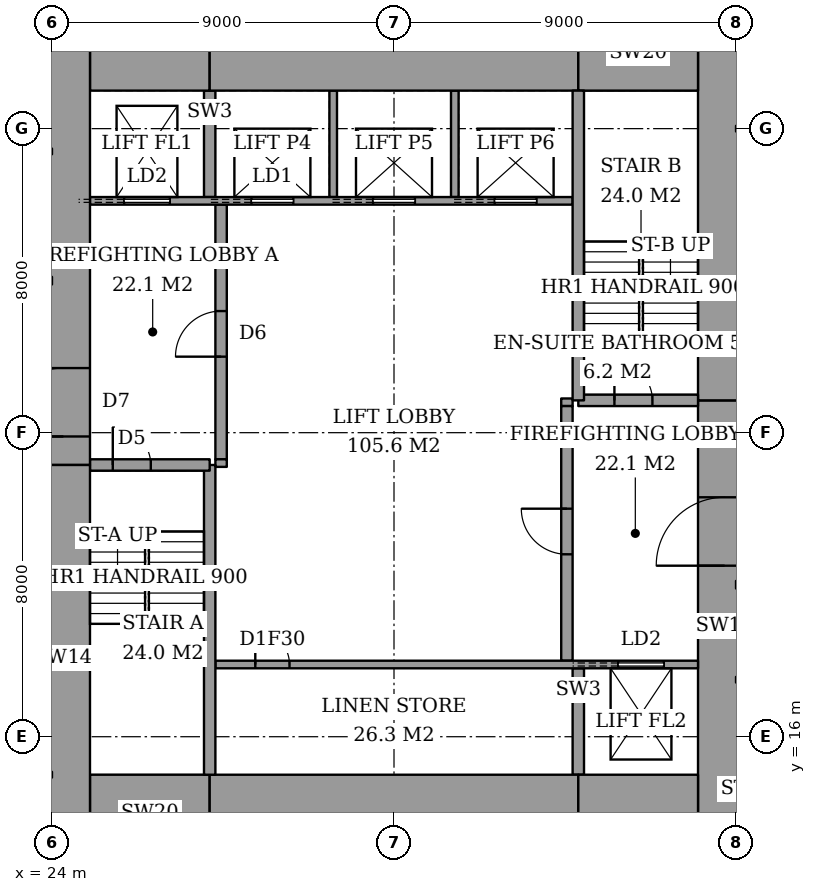
"""IFC4 building model, lengths in metres.
Left out: names, types, materials, properties, quantities, classifications, styles, units other than length and angle.
Written with IfcOpenShell. Run it as: python <this file> out.ifc"""

import sys

from ifc_helpers import new_model, si_unit, direction, frame, frame_2d, origin, place, context, subcontext, project, spatial, rectangle, extrude, element, fill, save


model = new_model("IFC4")
c1 = context("Model", 3, precision=1e-05, world=origin(), true_north=direction((0.0, 1.0)))
c2 = subcontext(c1, "Body", "Model", "MODEL_VIEW")
j1 = project(units=[si_unit("LENGTHUNIT", "METRE"), si_unit("PLANEANGLEUNIT", "RADIAN")], contexts=[c1])
p1 = place(None, origin())
s1 = spatial("IfcSite", under=j1, at=p1, CompositionType="ELEMENT")
p2 = place(p1, origin())
s2 = spatial("IfcBuilding", under=s1, at=p2, CompositionType="ELEMENT")
p3 = place(p2, frame((0.0, 0.0, 211.0)))
s3 = spatial("IfcBuildingStorey", under=s2, at=p3, CompositionType="ELEMENT", Elevation=211.0)
p4 = place(p3, frame((25.0, 14.0, 0.0), z_axis=(0.0, 0.0, 1.0), x_axis=(1.0, 0.0, 0.0)))
e1 = element("IfcWall", 1, at=p4, inside=s3, PredefinedType="SHEAR", context=c2, shape_type="SweptSolid", body=[
    extrude(rectangle(XDim=3.15, YDim=2.0, at=frame_2d((1.575, 0.0))), origin(), (0.0, 0.0, 1.0), 3.6),
])
p5 = place(p3, frame((28.15, 14.0, 0.0), z_axis=(0.0, 0.0, 1.0), x_axis=(1.0, 0.0, 0.0)))
e2 = element("IfcWall", 2, at=p5, inside=s3, PredefinedType="SHEAR", context=c2, shape_type="SweptSolid", body=[
    extrude(rectangle(XDim=9.7, YDim=2.0, at=frame_2d((4.85, 0.0))), origin(), (0.0, 0.0, 1.0), 3.6),
])
for number, where, z_axis, x_axis in (
    (3, (37.85, 14.0, 0.0), (0.0, 0.0, 1.0), (1.0, 0.0, 0.0)),
    (4, (25.0, 34.0, 0.0), (0.0, 0.0, 1.0), (1.0, 0.0, 0.0)),
):
    element("IfcWall", number, at=place(p3, frame(where, z_axis=z_axis, x_axis=x_axis)), inside=s3, PredefinedType="SHEAR", context=c2, shape_type="SweptSolid", body=[
        extrude(rectangle(XDim=3.15, YDim=2.0, at=frame_2d((1.575, 0.0))), origin(), (0.0, 0.0, 1.0), 3.6),
    ])
p6 = place(p3, frame((28.15, 34.0, 0.0), z_axis=(0.0, 0.0, 1.0), x_axis=(1.0, 0.0, 0.0)))
e5 = element("IfcWall", 5, at=p6, inside=s3, PredefinedType="SHEAR", context=c2, shape_type="SweptSolid", body=[
    extrude(rectangle(XDim=9.7, YDim=2.0, at=frame_2d((4.85, 0.0))), origin(), (0.0, 0.0, 1.0), 3.6),
])
p7 = place(p3, frame((37.85, 34.0, 0.0), z_axis=(0.0, 0.0, 1.0), x_axis=(1.0, 0.0, 0.0)))
e6 = element("IfcWall", 6, at=p7, inside=s3, PredefinedType="SHEAR", context=c2, shape_type="SweptSolid", body=[
    extrude(rectangle(XDim=3.15, YDim=2.0, at=frame_2d((1.575, 0.0))), origin(), (0.0, 0.0, 1.0), 3.6),
])
p8 = place(p3, frame((24.3, 13.0, 0.0), z_axis=(0.0, 0.0, 1.0), x_axis=(0.0, 1.0, 0.0)))
e7 = element("IfcWall", 7, at=p8, inside=s3, PredefinedType="SHEAR", context=c2, shape_type="SweptSolid", body=[
    extrude(rectangle(XDim=10.15, YDim=1.4, at=frame_2d((5.075, 0.0))), origin(), (0.0, 0.0, 1.0), 3.6),
])
p9 = place(p3, frame((24.3, 23.15, 0.0), z_axis=(0.0, 0.0, 1.0), x_axis=(0.0, 1.0, 0.0)))
e8 = element("IfcWall", 8, at=p9, inside=s3, PredefinedType="SHEAR", context=c2, shape_type="SweptSolid", body=[
    extrude(rectangle(XDim=11.85, YDim=1.4, at=frame_2d((5.925, 0.0))), origin(), (0.0, 0.0, 1.0), 3.6),
])
p10 = place(p9, frame((0.75, 0.0, 0.0)))
e9 = element("IfcOpeningElement", 9, at=p10, cuts=e8, PredefinedType="OPENING", context=c2, shape_type="SweptSolid", body=[
    extrude(rectangle(XDim=1.8, YDim=2.4, at=frame_2d((0.9, 1.2))), frame((0.0, 0.71, 0.0), z_axis=(0.0, -1.0, 0.0), x_axis=(1.0, 0.0, 0.0)), (0.0, 0.0, 1.0), 1.42),
])
p11 = place(p3, frame((41.7, 13.0, 0.0), z_axis=(0.0, 0.0, 1.0), x_axis=(0.0, 1.0, 0.0)))
e10 = element("IfcWall", 10, at=p11, inside=s3, PredefinedType="SHEAR", context=c2, shape_type="SweptSolid", body=[
    extrude(rectangle(XDim=11.85, YDim=1.4, at=frame_2d((5.925, 0.0))), origin(), (0.0, 0.0, 1.0), 3.6),
])
p12 = place(p11, frame((7.5, 0.0, 0.0)))
e11 = element("IfcOpeningElement", 11, at=p12, cuts=e10, PredefinedType="OPENING", context=c2, shape_type="SweptSolid", body=[
    extrude(rectangle(XDim=1.8, YDim=2.4, at=frame_2d((0.9, 1.2))), frame((0.0, 0.71, 0.0), z_axis=(0.0, -1.0, 0.0), x_axis=(1.0, 0.0, 0.0)), (0.0, 0.0, 1.0), 1.42),
])
p13 = place(p3, frame((41.7, 24.85, 0.0), z_axis=(0.0, 0.0, 1.0), x_axis=(0.0, 1.0, 0.0)))
e12 = element("IfcWall", 12, at=p13, inside=s3, PredefinedType="SHEAR", context=c2, shape_type="SweptSolid", body=[
    extrude(rectangle(XDim=10.15, YDim=1.4, at=frame_2d((5.075, 0.0))), origin(), (0.0, 0.0, 1.0), 3.6),
])
p14 = place(p3, frame((28.15, 15.0, 0.0), z_axis=(0.0, 0.0, 1.0), x_axis=(0.0, 1.0, 0.0)))
e13 = element("IfcWall", 13, at=p14, inside=s3, PredefinedType="SHEAR", context=c2, shape_type="SweptSolid", body=[
    extrude(rectangle(XDim=8.15, YDim=0.3, at=frame_2d((4.075, 0.0))), origin(), (0.0, 0.0, 1.0), 3.6),
])
p15 = place(p3, frame((25.0, 23.15, 0.0), z_axis=(0.0, 0.0, 1.0), x_axis=(1.0, 0.0, 0.0)))
e14 = element("IfcWall", 14, at=p15, inside=s3, PredefinedType="SHEAR", context=c2, shape_type="SweptSolid", body=[
    extrude(rectangle(XDim=3.15, YDim=0.3, at=frame_2d((1.575, 0.0))), origin(), (0.0, 0.0, 1.0), 3.6),
])
p16 = place(p15, frame((0.6, 0.0, 0.0)))
e15 = element("IfcOpeningElement", 15, at=p16, cuts=e14, PredefinedType="OPENING", context=c2, shape_type="SweptSolid", body=[
    extrude(rectangle(XDim=1.0, YDim=2.1, at=frame_2d((0.5, 1.05))), frame((0.0, 0.16, 0.0), z_axis=(0.0, -1.0, 0.0), x_axis=(1.0, 0.0, 0.0)), (0.0, 0.0, 1.0), 0.32),
])
p17 = place(p3, frame((37.85, 24.85, 0.0), z_axis=(0.0, 0.0, 1.0), x_axis=(0.0, 1.0, 0.0)))
e16 = element("IfcWall", 16, at=p17, inside=s3, PredefinedType="SHEAR", context=c2, shape_type="SweptSolid", body=[
    extrude(rectangle(XDim=8.15, YDim=0.3, at=frame_2d((4.075, 0.0))), origin(), (0.0, 0.0, 1.0), 3.6),
])
p18 = place(p3, frame((37.85, 24.85, 0.0), z_axis=(0.0, 0.0, 1.0), x_axis=(1.0, 0.0, 0.0)))
e17 = element("IfcWall", 17, at=p18, inside=s3, PredefinedType="SHEAR", context=c2, shape_type="SweptSolid", body=[
    extrude(rectangle(XDim=3.15, YDim=0.3, at=frame_2d((1.575, 0.0))), origin(), (0.0, 0.0, 1.0), 3.6),
])
p19 = place(p18, frame((0.95, 0.0, 0.0)))
e18 = element("IfcOpeningElement", 18, at=p19, cuts=e17, PredefinedType="OPENING", context=c2, shape_type="SweptSolid", body=[
    extrude(rectangle(XDim=1.0, YDim=2.1, at=frame_2d((0.5, 1.05))), frame((0.0, 0.16, 0.0), z_axis=(0.0, -1.0, 0.0), x_axis=(1.0, 0.0, 0.0)), (0.0, 0.0, 1.0), 0.32),
])
p20 = place(p3, frame((28.45, 23.3, 0.0), z_axis=(0.0, 0.0, 1.0), x_axis=(0.0, 1.0, 0.0)))
e19 = element("IfcWall", 19, at=p20, inside=s3, PredefinedType="PARTITIONING", context=c2, shape_type="SweptSolid", body=[
    extrude(rectangle(XDim=6.7, YDim=0.3, at=frame_2d((3.35, 0.0))), origin(), (0.0, 0.0, 1.0), 3.6),
])
p21 = place(p20, frame((2.7, 0.0, 0.0)))
e20 = element("IfcOpeningElement", 20, at=p21, cuts=e19, PredefinedType="OPENING", context=c2, shape_type="SweptSolid", body=[
    extrude(rectangle(XDim=1.2, YDim=2.1, at=frame_2d((0.6, 1.05))), frame((0.0, 0.16, 0.0), z_axis=(0.0, -1.0, 0.0), x_axis=(1.0, 0.0, 0.0)), (0.0, 0.0, 1.0), 0.32),
])
p22 = place(p3, frame((37.55, 18.0, 0.0), z_axis=(0.0, 0.0, 1.0), x_axis=(0.0, 1.0, 0.0)))
e21 = element("IfcWall", 21, at=p22, inside=s3, PredefinedType="PARTITIONING", context=c2, shape_type="SweptSolid", body=[
    extrude(rectangle(XDim=6.7, YDim=0.3, at=frame_2d((3.35, 0.0))), origin(), (0.0, 0.0, 1.0), 3.6),
])
p23 = place(p22, frame((2.8, 0.0, 0.0)))
e22 = element("IfcOpeningElement", 22, at=p23, cuts=e21, PredefinedType="OPENING", context=c2, shape_type="SweptSolid", body=[
    extrude(rectangle(XDim=1.2, YDim=2.1, at=frame_2d((0.6, 1.05))), frame((0.0, 0.16, 0.0), z_axis=(0.0, -1.0, 0.0), x_axis=(1.0, 0.0, 0.0)), (0.0, 0.0, 1.0), 0.32),
])
p24 = place(p3, frame((28.3, 17.9, 0.0), z_axis=(0.0, 0.0, 1.0), x_axis=(1.0, 0.0, 0.0)))
e23 = element("IfcWall", 23, at=p24, inside=s3, PredefinedType="PARTITIONING", context=c2, shape_type="SweptSolid", body=[
    extrude(rectangle(XDim=12.7, YDim=0.2, at=frame_2d((6.35, 0.0))), origin(), (0.0, 0.0, 1.0), 3.6),
])
p25 = place(p24, frame((1.05, 0.0, 0.0)))
e24 = element("IfcOpeningElement", 24, at=p25, cuts=e23, PredefinedType="OPENING", context=c2, shape_type="SweptSolid", body=[
    extrude(rectangle(XDim=0.9, YDim=2.1, at=frame_2d((0.45, 1.05))), frame((0.0, 0.11, 0.0), z_axis=(0.0, -1.0, 0.0), x_axis=(1.0, 0.0, 0.0)), (0.0, 0.0, 1.0), 0.22),
])
p26 = place(p24, frame((10.6, 0.0, 0.0)))
e25 = element("IfcOpeningElement", 25, at=p26, cuts=e23, PredefinedType="OPENING", context=c2, shape_type="SweptSolid", body=[
    extrude(rectangle(XDim=1.2, YDim=2.1, at=frame_2d((0.6, 1.05))), frame((0.0, 0.11, 0.0), z_axis=(0.0, -1.0, 0.0), x_axis=(1.0, 0.0, 0.0)), (0.0, 0.0, 1.0), 0.22),
])
p27 = place(p3, frame((25.0, 30.1, 0.0), z_axis=(0.0, 0.0, 1.0), x_axis=(1.0, 0.0, 0.0)))
e26 = element("IfcWall", 26, at=p27, inside=s3, PredefinedType="PARTITIONING", context=c2, shape_type="SweptSolid", body=[
    extrude(rectangle(XDim=12.7, YDim=0.2, at=frame_2d((6.35, 0.0))), origin(), (0.0, 0.0, 1.0), 3.6),
])
p28 = place(p27, frame((4.25, 0.0, 0.0)))
e27 = element("IfcOpeningElement", 27, at=p28, cuts=e26, PredefinedType="OPENING", context=c2, shape_type="SweptSolid", body=[
    extrude(rectangle(XDim=1.1, YDim=2.1, at=frame_2d((0.55, 1.05))), frame((0.0, 0.11, 0.0), z_axis=(0.0, -1.0, 0.0), x_axis=(1.0, 0.0, 0.0)), (0.0, 0.0, 1.0), 0.22),
])
p29 = place(p27, frame((7.45, 0.0, 0.0)))
e28 = element("IfcOpeningElement", 28, at=p29, cuts=e26, PredefinedType="OPENING", context=c2, shape_type="SweptSolid", body=[
    extrude(rectangle(XDim=1.1, YDim=2.1, at=frame_2d((0.55, 1.05))), frame((0.0, 0.11, 0.0), z_axis=(0.0, -1.0, 0.0), x_axis=(1.0, 0.0, 0.0)), (0.0, 0.0, 1.0), 0.22),
])
p30 = place(p27, frame((10.65, 0.0, 0.0)))
e29 = element("IfcOpeningElement", 29, at=p30, cuts=e26, PredefinedType="OPENING", context=c2, shape_type="SweptSolid", body=[
    extrude(rectangle(XDim=1.1, YDim=2.1, at=frame_2d((0.55, 1.05))), frame((0.0, 0.11, 0.0), z_axis=(0.0, -1.0, 0.0), x_axis=(1.0, 0.0, 0.0)), (0.0, 0.0, 1.0), 0.22),
])
p31 = place(p27, frame((0.9, 0.0, 0.0)))
e30 = element("IfcOpeningElement", 30, at=p31, cuts=e26, PredefinedType="OPENING", context=c2, shape_type="SweptSolid", body=[
    extrude(rectangle(XDim=1.2, YDim=2.1, at=frame_2d((0.6, 1.05))), frame((0.0, 0.11, 0.0), z_axis=(0.0, -1.0, 0.0), x_axis=(1.0, 0.0, 0.0)), (0.0, 0.0, 1.0), 0.22),
])
p32 = place(p3, frame((37.85, 15.0, 0.0), z_axis=(0.0, 0.0, 1.0), x_axis=(0.0, 1.0, 0.0)))
e31 = element("IfcWall", 31, at=p32, inside=s3, PredefinedType="SHEAR", context=c2, shape_type="SweptSolid", body=[
    extrude(rectangle(XDim=2.8, YDim=0.3, at=frame_2d((1.4, 0.0))), origin(), (0.0, 0.0, 1.0), 3.6),
])
for number, where, z_axis, x_axis in (
    (32, (31.4, 30.2, 0.0), (0.0, 0.0, 1.0), (0.0, 1.0, 0.0)),
    (33, (34.6, 30.2, 0.0), (0.0, 0.0, 1.0), (0.0, 1.0, 0.0)),
):
    element("IfcWall", number, at=place(p3, frame(where, z_axis=z_axis, x_axis=x_axis)), inside=s3, PredefinedType="PARTITIONING", context=c2, shape_type="SweptSolid", body=[
        extrude(rectangle(XDim=2.8, YDim=0.2, at=frame_2d((1.4, 0.0))), origin(), (0.0, 0.0, 1.0), 3.6),
    ])
p33 = place(p3, frame((28.15, 30.2, 0.0), z_axis=(0.0, 0.0, 1.0), x_axis=(0.0, 1.0, 0.0)))
e34 = element("IfcWall", 34, at=p33, inside=s3, PredefinedType="SHEAR", context=c2, shape_type="SweptSolid", body=[
    extrude(rectangle(XDim=2.8, YDim=0.3, at=frame_2d((1.4, 0.0))), origin(), (0.0, 0.0, 1.0), 3.6),
])
for number, where, z_axis, x_axis in (
    (35, (28.3, 23.2, 0.0), (0.0, 0.0, 1.0), (1.0, 0.0, 0.0)),
    (36, (37.4, 24.8, 0.0), (0.0, 0.0, 1.0), (1.0, 0.0, 0.0)),
):
    element("IfcWall", number, at=place(p3, frame(where, z_axis=z_axis, x_axis=x_axis)), inside=s3, PredefinedType="PARTITIONING", context=c2, shape_type="SweptSolid", body=[
        extrude(rectangle(XDim=0.3, YDim=0.2, at=frame_2d((0.15, 0.0))), origin(), (0.0, 0.0, 1.0), 3.6),
    ])
p34 = place(p16, origin())
e37 = element("IfcDoor", 37, at=p34, inside=s3, OperationType="SINGLE_SWING_RIGHT", PredefinedType="DOOR", context=c2, shape_type="SweptSolid", body=[
    extrude(rectangle(XDim=1.0, YDim=2.1, at=frame_2d((0.5, 1.05))), frame((0.0, 0.025, 0.0), z_axis=(0.0, -1.0, 0.0), x_axis=(1.0, 0.0, 0.0)), (0.0, 0.0, 1.0), 0.05),
])
fill(e15, e37)
p35 = place(p19, origin())
e38 = element("IfcDoor", 38, at=p35, inside=s3, OperationType="SINGLE_SWING_RIGHT", PredefinedType="DOOR", context=c2, shape_type="SweptSolid", body=[
    extrude(rectangle(XDim=1.0, YDim=2.1, at=frame_2d((0.5, 1.05))), frame((0.0, 0.025, 0.0), z_axis=(0.0, -1.0, 0.0), x_axis=(1.0, 0.0, 0.0)), (0.0, 0.0, 1.0), 0.05),
])
fill(e18, e38)
p36 = place(p21, origin())
e39 = element("IfcDoor", 39, at=p36, inside=s3, OperationType="SINGLE_SWING_RIGHT", PredefinedType="DOOR", context=c2, shape_type="SweptSolid", body=[
    extrude(rectangle(XDim=1.2, YDim=2.1, at=frame_2d((0.6, 1.05))), frame((0.0, 0.025, 0.0), z_axis=(0.0, -1.0, 0.0), x_axis=(1.0, 0.0, 0.0)), (0.0, 0.0, 1.0), 0.05),
])
fill(e20, e39)
p37 = place(p23, origin())
e40 = element("IfcDoor", 40, at=p37, inside=s3, OperationType="SINGLE_SWING_LEFT", PredefinedType="DOOR", context=c2, shape_type="SweptSolid", body=[
    extrude(rectangle(XDim=1.2, YDim=2.1, at=frame_2d((0.6, 1.05))), frame((0.0, 0.025, 0.0), z_axis=(0.0, -1.0, 0.0), x_axis=(1.0, 0.0, 0.0)), (0.0, 0.0, 1.0), 0.05),
])
fill(e22, e40)
p38 = place(p10, origin())
e41 = element("IfcDoor", 41, at=p38, inside=s3, OperationType="DOUBLE_DOOR_DOUBLE_SWING", PredefinedType="DOOR", context=c2, shape_type="SweptSolid", body=[
    extrude(rectangle(XDim=1.8, YDim=2.4, at=frame_2d((0.9, 1.2))), frame((0.0, 0.025, 0.0), z_axis=(0.0, -1.0, 0.0), x_axis=(1.0, 0.0, 0.0)), (0.0, 0.0, 1.0), 0.05),
])
fill(e9, e41)
p39 = place(p12, origin())
e42 = element("IfcDoor", 42, at=p39, inside=s3, OperationType="DOUBLE_DOOR_DOUBLE_SWING", PredefinedType="DOOR", context=c2, shape_type="SweptSolid", body=[
    extrude(rectangle(XDim=1.8, YDim=2.4, at=frame_2d((0.9, 1.2))), frame((0.0, 0.025, 0.0), z_axis=(0.0, -1.0, 0.0), x_axis=(1.0, 0.0, 0.0)), (0.0, 0.0, 1.0), 0.05),
])
fill(e11, e42)
p40 = place(p25, origin())
e43 = element("IfcDoor", 43, at=p40, inside=s3, OperationType="SINGLE_SWING_RIGHT", PredefinedType="DOOR", context=c2, shape_type="SweptSolid", body=[
    extrude(rectangle(XDim=0.9, YDim=2.1, at=frame_2d((0.45, 1.05))), frame((0.0, 0.025, 0.0), z_axis=(0.0, -1.0, 0.0), x_axis=(1.0, 0.0, 0.0)), (0.0, 0.0, 1.0), 0.05),
])
fill(e24, e43)
p41 = place(p28, origin())
e44 = element("IfcDoor", 44, at=p41, inside=s3, OperationType="SLIDING_TO_LEFT", PredefinedType="DOOR", context=c2, shape_type="SweptSolid", body=[
    extrude(rectangle(XDim=1.1, YDim=2.1, at=frame_2d((0.55, 1.05))), frame((0.0, 0.025, 0.0), z_axis=(0.0, -1.0, 0.0), x_axis=(1.0, 0.0, 0.0)), (0.0, 0.0, 1.0), 0.05),
])
fill(e27, e44)
p42 = place(p29, origin())
e45 = element("IfcDoor", 45, at=p42, inside=s3, OperationType="SLIDING_TO_LEFT", PredefinedType="DOOR", context=c2, shape_type="SweptSolid", body=[
    extrude(rectangle(XDim=1.1, YDim=2.1, at=frame_2d((0.55, 1.05))), frame((0.0, 0.025, 0.0), z_axis=(0.0, -1.0, 0.0), x_axis=(1.0, 0.0, 0.0)), (0.0, 0.0, 1.0), 0.05),
])
fill(e28, e45)
p43 = place(p30, origin())
e46 = element("IfcDoor", 46, at=p43, inside=s3, OperationType="SLIDING_TO_LEFT", PredefinedType="DOOR", context=c2, shape_type="SweptSolid", body=[
    extrude(rectangle(XDim=1.1, YDim=2.1, at=frame_2d((0.55, 1.05))), frame((0.0, 0.025, 0.0), z_axis=(0.0, -1.0, 0.0), x_axis=(1.0, 0.0, 0.0)), (0.0, 0.0, 1.0), 0.05),
])
fill(e29, e46)
p44 = place(p31, origin())
e47 = element("IfcDoor", 47, at=p44, inside=s3, OperationType="SLIDING_TO_LEFT", PredefinedType="DOOR", context=c2, shape_type="SweptSolid", body=[
    extrude(rectangle(XDim=1.2, YDim=2.1, at=frame_2d((0.6, 1.05))), frame((0.0, 0.025, 0.0), z_axis=(0.0, -1.0, 0.0), x_axis=(1.0, 0.0, 0.0)), (0.0, 0.0, 1.0), 0.05),
])
fill(e30, e47)
p45 = place(p26, origin())
e48 = element("IfcDoor", 48, at=p45, inside=s3, OperationType="SLIDING_TO_LEFT", PredefinedType="DOOR", context=c2, shape_type="SweptSolid", body=[
    extrude(rectangle(XDim=1.2, YDim=2.1, at=frame_2d((0.6, 1.05))), frame((0.0, 0.025, 0.0), z_axis=(0.0, -1.0, 0.0), x_axis=(1.0, 0.0, 0.0)), (0.0, 0.0, 1.0), 0.05),
])
fill(e25, e48)
save(model, sys.argv[1])
